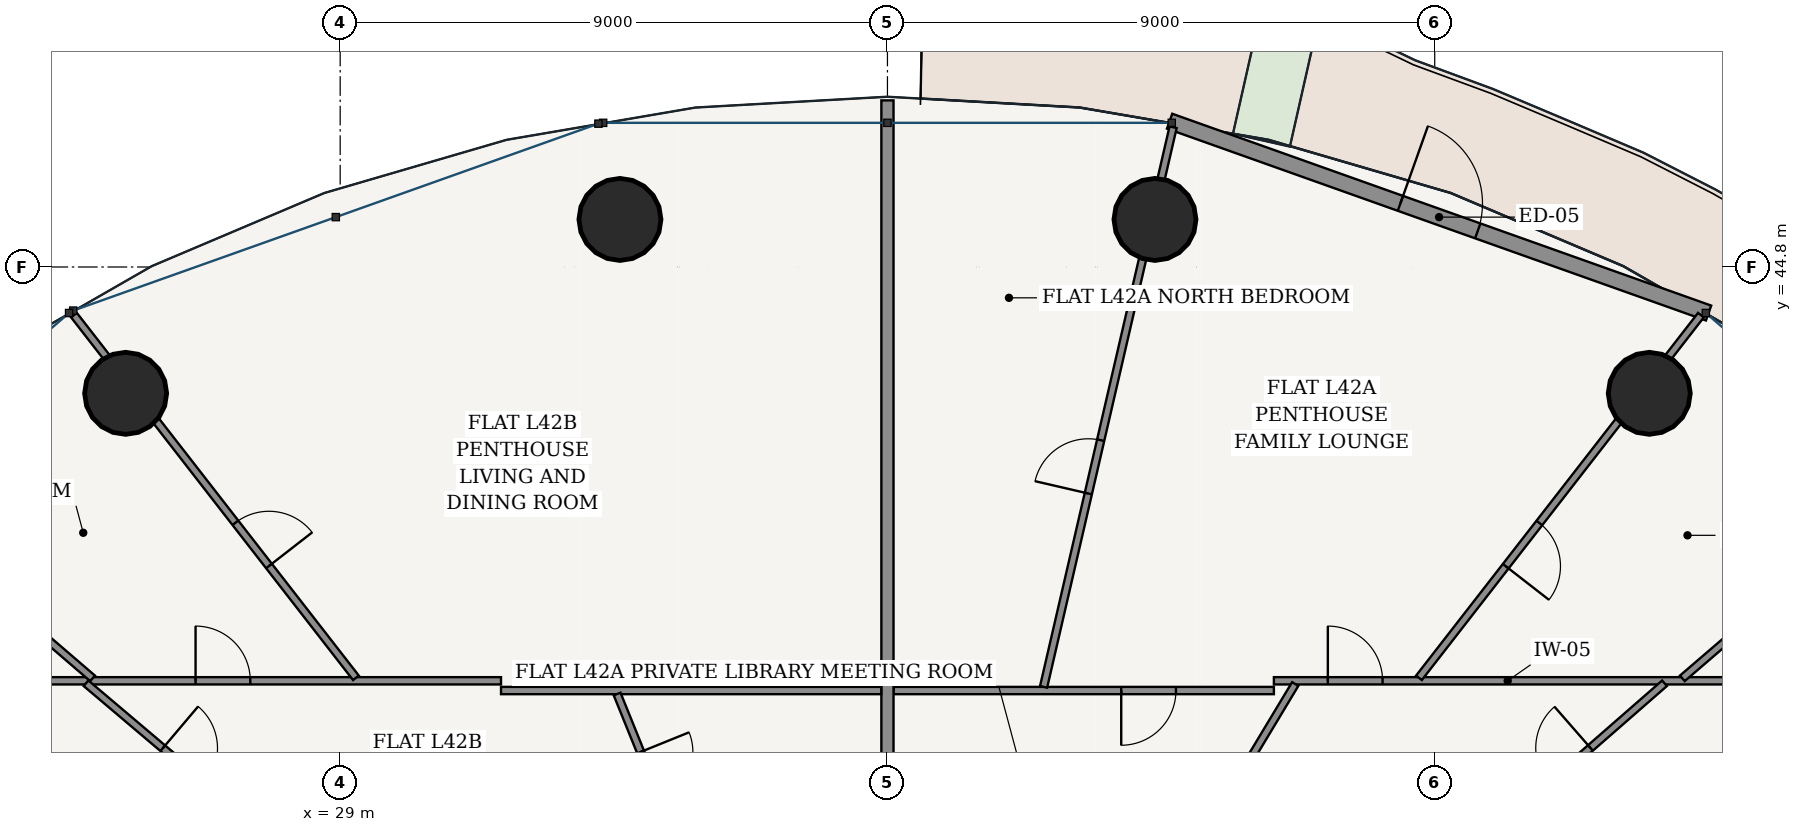
"""IFC4 building model, lengths in metres.
Left out: names, types, materials, properties, quantities, classifications, styles, units other than length and angle.
Written with IfcOpenShell. Run it as: python <this file> out.ifc"""

import sys

from ifc_helpers import new_model, si_unit, direction, frame, frame_2d, origin, origin_2d, place, context, subcontext, project, spatial, rectangle, hollow_circle, extrude, source, transform, mapped, element, fill, save


model = new_model("IFC4")
c1 = context("Model", 3, precision=1e-05, world=origin(), true_north=direction((-0.2419218956, 0.970295726276)))
c2 = subcontext(c1, "Body", "Model", "MODEL_VIEW")
j1 = project(units=[si_unit("LENGTHUNIT", "METRE"), si_unit("PLANEANGLEUNIT", "RADIAN")], contexts=[c1])
p1 = place(None, origin())
s1 = spatial("IfcSite", under=j1, at=p1, CompositionType="ELEMENT")
p2 = place(p1, origin())
s2 = spatial("IfcBuilding", under=s1, at=p2, CompositionType="ELEMENT")
p3 = place(p2, frame((0.0, 0.0, 160.6)))
s3 = spatial("IfcBuildingStorey", under=s2, at=p3, CompositionType="ELEMENT", Elevation=160.6)
for number, where, z_axis, x_axis in (
    (1, (50.528, 42.723, 0.0), (0.0, 0.0, 1.0), (1.0, 0.0, 0.0)),
    (2, (42.399, 45.582, 0.0), (0.0, 0.0, 1.0), (1.0, 0.0, 0.0)),
    (3, (33.601, 45.582, 0.0), (0.0, 0.0, 1.0), (1.0, 0.0, 0.0)),
    (4, (25.472, 42.723, 0.0), (0.0, 0.0, 1.0), (1.0, 0.0, 0.0)),
):
    element("IfcColumn", number, at=place(p3, frame(where, z_axis=z_axis, x_axis=x_axis)), inside=s3, PredefinedType="COLUMN", context=c2, shape_type="SweptSolid", body=[
        extrude(hollow_circle(Radius=0.675, WallThickness=0.042, at=origin_2d()), origin(), (0.0, 0.0, 1.0), 3.6),
    ])
p4 = place(p3, frame((51.503, 44.043, 0.0), z_axis=(0.0, 0.0, 1.0), x_axis=(-0.942095406405, 0.335344964522, 0.0)))
e5 = element("IfcWall", 5, at=p4, inside=s3, PredefinedType="SOLIDWALL", context=c2, shape_type="SweptSolid", body=[
    extrude(rectangle(XDim=9.408, YDim=0.26, at=frame_2d((4.704, 0.0))), origin(), (0.0, 0.0, 1.0), 3.33),
])
p5 = place(p4, frame((4.029, 0.0, 0.0)))
e6 = element("IfcOpeningElement", 6, at=p5, cuts=e5, PredefinedType="OPENING", context=c2, shape_type="SweptSolid", body=[
    extrude(rectangle(XDim=1.35, YDim=2.2, at=frame_2d((0.675, 1.1))), frame((0.0, 0.14, 0.0), z_axis=(0.0, -1.0, 0.0), x_axis=(1.0, 0.0, 0.0)), (0.0, 0.0, 1.0), 0.28),
])
p6 = place(p3, frame((38.102, 37.835, 0.0), z_axis=(0.0, 0.0, 1.0), x_axis=(1.0, 0.0, 0.0)))
e7 = element("IfcWall", 7, at=p6, inside=s3, PredefinedType="PARTITIONING", context=c2, shape_type="SweptSolid", body=[
    extrude(rectangle(XDim=6.253, YDim=0.12, at=frame_2d((3.126, 0.0))), origin(), (0.0, 0.0, 1.0), 2.776),
])
p7 = place(p6, frame((3.742, 0.0, 0.0)))
e8 = element("IfcOpeningElement", 8, at=p7, cuts=e7, PredefinedType="OPENING", context=c2, shape_type="SweptSolid", body=[
    extrude(rectangle(XDim=0.9, YDim=2.15, at=frame_2d((0.45, 1.075))), frame((0.0, 0.07, 0.0), z_axis=(0.0, -1.0, 0.0), x_axis=(1.0, 0.0, 0.0)), (0.0, 0.0, 1.0), 0.14),
])
p8 = place(p3, frame((44.355, 37.995, 0.0), z_axis=(0.0, 0.0, 1.0), x_axis=(1.0, 0.0, 0.0)))
e9 = element("IfcWall", 9, at=p8, inside=s3, PredefinedType="PARTITIONING", context=c2, shape_type="SweptSolid", body=[
    extrude(rectangle(XDim=7.69, YDim=0.12, at=frame_2d((3.845, 0.0))), origin(), (0.0, 0.0, 1.0), 2.776),
])
p9 = place(p8, frame((0.887, 0.0, 0.0)))
e10 = element("IfcOpeningElement", 10, at=p9, cuts=e9, PredefinedType="OPENING", context=c2, shape_type="SweptSolid", body=[
    extrude(rectangle(XDim=0.9, YDim=2.15, at=frame_2d((0.45, 1.075))), frame((0.0, 0.07, 0.0), z_axis=(0.0, -1.0, 0.0), x_axis=(1.0, 0.0, 0.0)), (0.0, 0.0, 1.0), 0.14),
])
p10 = place(p3, frame((51.072, 38.035, 0.0), z_axis=(0.0, 0.0, 1.0), x_axis=(0.758368609512, 0.65182593697, 0.0)))
e11 = element("IfcWall", 11, at=p10, inside=s3, PredefinedType="PARTITIONING", context=c2, shape_type="SweptSolid", body=[
    extrude(rectangle(XDim=5.263, YDim=0.12, at=frame_2d((2.632, 0.0))), origin(), (0.0, 0.0, 1.0), 2.846),
])
p11 = place(p3, frame((46.741, 38.044, 0.0), z_axis=(0.0, 0.0, 1.0), x_axis=(0.613770587295, 0.789484430607, 0.0)))
e12 = element("IfcWall", 12, at=p11, inside=s3, PredefinedType="PARTITIONING", context=c2, shape_type="SweptSolid", body=[
    extrude(rectangle(XDim=7.556, YDim=0.12, at=frame_2d((3.778, 0.0))), origin(), (0.0, 0.0, 1.0), 2.776),
])
p12 = place(p11, frame((2.325, 0.0, 0.0)))
e13 = element("IfcOpeningElement", 13, at=p12, cuts=e12, PredefinedType="OPENING", context=c2, shape_type="SweptSolid", body=[
    extrude(rectangle(XDim=0.9, YDim=2.15, at=frame_2d((0.45, 1.075))), frame((0.0, 0.07, 0.0), z_axis=(0.0, -1.0, 0.0), x_axis=(1.0, 0.0, 0.0)), (0.0, 0.0, 1.0), 0.14),
])
p13 = place(p3, frame((40.568, 37.896, 0.0), z_axis=(0.0, 0.0, 1.0), x_axis=(0.225452174141, 0.974254236416, 0.0)))
e14 = element("IfcWall", 14, at=p13, inside=s3, PredefinedType="PARTITIONING", context=c2, shape_type="SweptSolid", body=[
    extrude(rectangle(XDim=9.446, YDim=0.12, at=frame_2d((4.723, 0.0))), origin(), (0.0, 0.0, 1.0), 2.776),
])
p14 = place(p13, frame((3.264, 0.0, 0.0)))
e15 = element("IfcOpeningElement", 15, at=p14, cuts=e14, PredefinedType="OPENING", context=c2, shape_type="SweptSolid", body=[
    extrude(rectangle(XDim=0.9, YDim=2.15, at=frame_2d((0.45, 1.075))), frame((0.0, 0.07, 0.0), z_axis=(0.0, -1.0, 0.0), x_axis=(1.0, 0.0, 0.0)), (0.0, 0.0, 1.0), 0.14),
])
p15 = place(p3, frame((47.665, 35.236, 0.0), z_axis=(0.0, 0.0, 1.0), x_axis=(0.753384754287, 0.657579966246, 0.0)))
e16 = element("IfcWall", 16, at=p15, inside=s3, PredefinedType="PARTITIONING", context=c2, shape_type="SweptSolid", body=[
    extrude(rectangle(XDim=4.133, YDim=0.12, at=frame_2d((2.067, 0.0))), origin(), (0.0, 0.0, 1.0), 3.005),
])
p16 = place(p15, frame((1.617, 0.0, 0.0)))
e17 = element("IfcOpeningElement", 17, at=p16, cuts=e16, PredefinedType="OPENING", context=c2, shape_type="SweptSolid", body=[
    extrude(rectangle(XDim=0.9, YDim=2.15, at=frame_2d((0.45, 1.075))), frame((0.0, 0.07, 0.0), z_axis=(0.0, -1.0, 0.0), x_axis=(1.0, 0.0, 0.0)), (0.0, 0.0, 1.0), 0.14),
])
p17 = place(p3, frame((42.98, 35.075, 0.0), z_axis=(0.0, 0.0, 1.0), x_axis=(0.515686235332, 0.856777512946, 0.0)))
e18 = element("IfcWall", 18, at=p17, inside=s3, PredefinedType="PARTITIONING", context=c2, shape_type="SweptSolid", body=[
    extrude(rectangle(XDim=3.346, YDim=0.12, at=frame_2d((1.673, 0.0))), origin(), (0.0, 0.0, 1.0), 3.33),
])
p18 = place(p3, frame((38.0, 35.075, 0.0), z_axis=(0.0, 0.0, 1.0), x_axis=(0.0, 1.0, 0.0)))
e19 = element("IfcWall", 19, at=p18, inside=s3, PredefinedType="PARTITIONING", context=c2, shape_type="SweptSolid", body=[
    extrude(rectangle(XDim=12.465, YDim=0.2, at=frame_2d((6.232, 0.0))), origin(), (0.0, 0.0, 1.0), 2.415),
])
p19 = place(p3, frame((23.955, 37.995, 0.0), z_axis=(0.0, 0.0, 1.0), x_axis=(1.0, 0.0, 0.0)))
e20 = element("IfcWall", 20, at=p19, inside=s3, PredefinedType="PARTITIONING", context=c2, shape_type="SweptSolid", body=[
    extrude(rectangle(XDim=7.69, YDim=0.12, at=frame_2d((3.845, 0.0))), origin(), (0.0, 0.0, 1.0), 2.776),
])
p20 = place(p19, frame((2.667, 0.0, 0.0)))
e21 = element("IfcOpeningElement", 21, at=p20, cuts=e20, PredefinedType="OPENING", context=c2, shape_type="SweptSolid", body=[
    extrude(rectangle(XDim=0.9, YDim=2.15, at=frame_2d((0.45, 1.075))), frame((0.0, 0.07, 0.0), z_axis=(0.0, -1.0, 0.0), x_axis=(1.0, 0.0, 0.0)), (0.0, 0.0, 1.0), 0.14),
])
p21 = place(p3, frame((31.645, 37.835, 0.0), z_axis=(0.0, 0.0, 1.0), x_axis=(1.0, 0.0, 0.0)))
e22 = element("IfcWall", 22, at=p21, inside=s3, PredefinedType="PARTITIONING", context=c2, shape_type="SweptSolid", body=[
    extrude(rectangle(XDim=6.253, YDim=0.12, at=frame_2d((3.126, 0.0))), origin(), (0.0, 0.0, 1.0), 2.776),
])
p22 = place(p3, frame((29.259, 38.044, 0.0), z_axis=(0.0, 0.0, 1.0), x_axis=(-0.613770587295, 0.789484430607, 0.0)))
e23 = element("IfcWall", 23, at=p22, inside=s3, PredefinedType="PARTITIONING", context=c2, shape_type="SweptSolid", body=[
    extrude(rectangle(XDim=7.556, YDim=0.12, at=frame_2d((3.778, 0.0))), origin(), (0.0, 0.0, 1.0), 2.776),
])
p23 = place(p22, frame((2.33, 0.0, 0.0)))
e24 = element("IfcOpeningElement", 24, at=p23, cuts=e23, PredefinedType="OPENING", context=c2, shape_type="SweptSolid", body=[
    extrude(rectangle(XDim=0.9, YDim=2.15, at=frame_2d((0.45, 1.075))), frame((0.0, 0.07, 0.0), z_axis=(0.0, -1.0, 0.0), x_axis=(1.0, 0.0, 0.0)), (0.0, 0.0, 1.0), 0.14),
])
p24 = place(p3, frame((24.928, 38.035, 0.0), z_axis=(0.0, 0.0, 1.0), x_axis=(-0.758368609512, 0.65182593697, 0.0)))
e25 = element("IfcWall", 25, at=p24, inside=s3, PredefinedType="PARTITIONING", context=c2, shape_type="SweptSolid", body=[
    extrude(rectangle(XDim=5.263, YDim=0.12, at=frame_2d((2.632, 0.0))), origin(), (0.0, 0.0, 1.0), 2.846),
])
p25 = place(p3, frame((34.649, 35.075, 0.0), z_axis=(0.0, 0.0, 1.0), x_axis=(-0.37535719187, 0.926880239573, 0.0)))
e26 = element("IfcWall", 26, at=p25, inside=s3, PredefinedType="PARTITIONING", context=c2, shape_type="SweptSolid", body=[
    extrude(rectangle(XDim=2.916, YDim=0.12, at=frame_2d((1.458, 0.0))), origin(), (0.0, 0.0, 1.0), 3.33),
])
p26 = place(p25, frame((1.028, 0.0, 0.0)))
e27 = element("IfcOpeningElement", 27, at=p26, cuts=e26, PredefinedType="OPENING", context=c2, shape_type="SweptSolid", body=[
    extrude(rectangle(XDim=0.86, YDim=2.15, at=frame_2d((0.43, 1.075))), frame((0.0, 0.07, 0.0), z_axis=(0.0, -1.0, 0.0), x_axis=(1.0, 0.0, 0.0)), (0.0, 0.0, 1.0), 0.14),
])
p27 = place(p3, frame((28.032, 35.236, 0.0), z_axis=(0.0, 0.0, 1.0), x_axis=(-0.763324664245, 0.646015059388, 0.0)))
e28 = element("IfcWall", 28, at=p27, inside=s3, PredefinedType="PARTITIONING", context=c2, shape_type="SweptSolid", body=[
    extrude(rectangle(XDim=4.208, YDim=0.12, at=frame_2d((2.104, 0.0))), origin(), (0.0, 0.0, 1.0), 3.005),
])
p28 = place(p27, frame((1.654, 0.0, 0.0)))
e29 = element("IfcOpeningElement", 29, at=p28, cuts=e28, PredefinedType="OPENING", context=c2, shape_type="SweptSolid", body=[
    extrude(rectangle(XDim=0.9, YDim=2.15, at=frame_2d((0.45, 1.075))), frame((0.0, 0.07, 0.0), z_axis=(0.0, -1.0, 0.0), x_axis=(1.0, 0.0, 0.0)), (0.0, 0.0, 1.0), 0.14),
])
m1 = source(origin(), c2, "Body", "SweptSolid", [
    extrude(rectangle(XDim=1.35, YDim=2.2, at=frame_2d((0.675, 1.1))), frame((0.0, 0.025, 0.0), z_axis=(0.0, -1.0, 0.0), x_axis=(1.0, 0.0, 0.0)), (0.0, 0.0, 1.0), 0.05),
])
p29 = place(p5, frame((1.35, 0.0, 0.0), z_axis=(0.0, 0.0, 1.0), x_axis=(-1.0, 0.0, 0.0)))
e30 = element("IfcDoor", 30, at=p29, inside=s3, OperationType="SINGLE_SWING_LEFT", PredefinedType="DOOR", context=c2, shape_type="MappedRepresentation", body=[
    mapped(m1, transform((0.0, 0.0, 0.0), scale=1.0)),
])
fill(e6, e30)
m2 = source(origin(), c2, "Body", "SweptSolid", [
    extrude(rectangle(XDim=0.9, YDim=2.15, at=frame_2d((0.45, 1.075))), frame((0.0, 0.025, 0.0), z_axis=(0.0, -1.0, 0.0), x_axis=(1.0, 0.0, 0.0)), (0.0, 0.0, 1.0), 0.05),
])
p30 = place(p16, origin())
e31 = element("IfcDoor", 31, at=p30, inside=s3, OperationType="SINGLE_SWING_RIGHT", PredefinedType="DOOR", context=c2, shape_type="MappedRepresentation", body=[
    mapped(m2, transform((0.0, 0.0, 0.0), scale=1.0)),
])
fill(e17, e31)
p31 = place(p9, origin())
e32 = element("IfcDoor", 32, at=p31, inside=s3, OperationType="SINGLE_SWING_LEFT", PredefinedType="DOOR", context=c2, shape_type="MappedRepresentation", body=[
    mapped(m2, transform((0.0, 0.0, 0.0), scale=1.0)),
])
fill(e10, e32)
p32 = place(p7, frame((0.9, 0.0, 0.0), z_axis=(0.0, 0.0, 1.0), x_axis=(-1.0, 0.0, 0.0)))
e33 = element("IfcDoor", 33, at=p32, inside=s3, OperationType="SINGLE_SWING_RIGHT", PredefinedType="DOOR", context=c2, shape_type="MappedRepresentation", body=[
    mapped(m2, transform((0.0, 0.0, 0.0), scale=1.0)),
])
fill(e8, e33)
p33 = place(p12, frame((0.9, 0.0, 0.0), z_axis=(0.0, 0.0, 1.0), x_axis=(-1.0, 0.0, 0.0)))
e34 = element("IfcDoor", 34, at=p33, inside=s3, OperationType="SINGLE_SWING_RIGHT", PredefinedType="DOOR", context=c2, shape_type="MappedRepresentation", body=[
    mapped(m2, transform((0.0, 0.0, 0.0), scale=1.0)),
])
fill(e13, e34)
p34 = place(p14, origin())
e35 = element("IfcDoor", 35, at=p34, inside=s3, OperationType="SINGLE_SWING_LEFT", PredefinedType="DOOR", context=c2, shape_type="MappedRepresentation", body=[
    mapped(m2, transform((0.0, 0.0, 0.0), scale=1.0)),
])
fill(e15, e35)
p35 = place(p28, frame((0.9, 0.0, 0.0), z_axis=(0.0, 0.0, 1.0), x_axis=(-1.0, 0.0, 0.0)))
e36 = element("IfcDoor", 36, at=p35, inside=s3, OperationType="SINGLE_SWING_LEFT", PredefinedType="DOOR", context=c2, shape_type="MappedRepresentation", body=[
    mapped(m2, transform((0.0, 0.0, 0.0), scale=1.0)),
])
fill(e29, e36)
p36 = place(p20, origin())
e37 = element("IfcDoor", 37, at=p36, inside=s3, OperationType="SINGLE_SWING_LEFT", PredefinedType="DOOR", context=c2, shape_type="MappedRepresentation", body=[
    mapped(m2, transform((0.0, 0.0, 0.0), scale=1.0)),
])
fill(e21, e37)
p37 = place(p23, frame((0.9, 0.0, 0.0), z_axis=(0.0, 0.0, 1.0), x_axis=(-1.0, 0.0, 0.0)))
e38 = element("IfcDoor", 38, at=p37, inside=s3, OperationType="SINGLE_SWING_RIGHT", PredefinedType="DOOR", context=c2, shape_type="MappedRepresentation", body=[
    mapped(m2, transform((0.0, 0.0, 0.0), scale=1.0)),
])
fill(e24, e38)
save(model, sys.argv[1])
